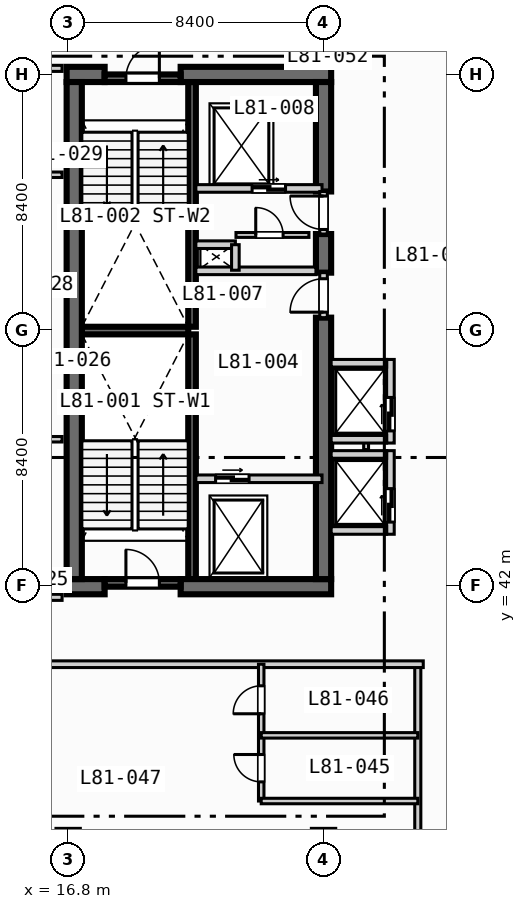
"""IFC4 building model, lengths in metres.
Left out: names, types, materials, properties, quantities, classifications, styles, units other than length and angle.
Written with IfcOpenShell. Run it as: python <this file> out.ifc"""

import sys

from ifc_helpers import new_model, si_unit, direction, frame, frame_2d, origin, place, context, subcontext, project, spatial, rectangle, extrude, element, fill, save


model = new_model("IFC4")
c1 = context("Model", 3, precision=1e-05, world=origin(), true_north=direction((0.0, 1.0)))
c2 = subcontext(c1, "Body", "Model", "MODEL_VIEW")
j1 = project(units=[si_unit("LENGTHUNIT", "METRE"), si_unit("PLANEANGLEUNIT", "RADIAN")], contexts=[c1])
p1 = place(None, origin())
s1 = spatial("IfcSite", under=j1, at=p1, CompositionType="ELEMENT")
p2 = place(p1, origin())
s2 = spatial("IfcBuilding", under=s1, at=p2, CompositionType="ELEMENT")
p3 = place(p2, frame((0.0, 0.0, 328.1)))
s3 = spatial("IfcBuildingStorey", under=s2, at=p3, CompositionType="ELEMENT", Elevation=328.1)
for number, where, z_axis, x_axis in (
    (1, (20.875, 42.2, 0.0), (0.0, 0.0, 1.0), (0.0, 1.0, 0.0)),
    (2, (20.875, 50.5, 0.0), (0.0, 0.0, 1.0), (0.0, 1.0, 0.0)),
):
    element("IfcWall", number, at=place(p3, frame(where, z_axis=z_axis, x_axis=x_axis)), inside=s3, PredefinedType="SOLIDWALL", context=c2, shape_type="SweptSolid", body=[
        extrude(rectangle(XDim=8.05, YDim=0.25, at=frame_2d((4.025, 0.0))), origin(), (0.0, 0.0, 1.0), 3.67),
    ])
p4 = place(p3, frame((17.25, 50.375, 0.0), z_axis=(0.0, 0.0, 1.0), x_axis=(1.0, 0.0, 0.0)))
e3 = element("IfcWall", 3, at=p4, inside=s3, PredefinedType="SOLIDWALL", context=c2, shape_type="SweptSolid", body=[
    extrude(rectangle(XDim=3.5, YDim=0.25, at=frame_2d((1.75, 0.0))), origin(), (0.0, 0.0, 1.0), 3.67),
])
p5 = place(p3, frame((16.75, 41.95, 0.0), z_axis=(0.0, 0.0, 1.0), x_axis=(1.0, 0.0, 0.0)))
e4 = element("IfcWall", 4, at=p5, inside=s3, PredefinedType="SHEAR", context=c2, shape_type="SweptSolid", body=[
    extrude(rectangle(XDim=1.25, YDim=0.5, at=frame_2d((0.625, 0.0))), origin(), (0.0, 0.0, 1.0), 3.67),
])
p6 = place(p3, frame((20.5, 41.95, 0.0), z_axis=(0.0, 0.0, 1.0), x_axis=(1.0, 0.0, 0.0)))
e5 = element("IfcWall", 5, at=p6, inside=s3, PredefinedType="SHEAR", context=c2, shape_type="SweptSolid", body=[
    extrude(rectangle(XDim=4.95, YDim=0.5, at=frame_2d((2.475, 0.0))), origin(), (0.0, 0.0, 1.0), 3.67),
])
p7 = place(p3, frame((16.75, 58.8, 0.0), z_axis=(0.0, 0.0, 1.0), x_axis=(1.0, 0.0, 0.0)))
e6 = element("IfcWall", 6, at=p7, inside=s3, PredefinedType="SHEAR", context=c2, shape_type="SweptSolid", body=[
    extrude(rectangle(XDim=1.25, YDim=0.5, at=frame_2d((0.625, 0.0))), origin(), (0.0, 0.0, 1.0), 3.67),
])
p8 = place(p3, frame((20.5, 58.8, 0.0), z_axis=(0.0, 0.0, 1.0), x_axis=(1.0, 0.0, 0.0)))
e7 = element("IfcWall", 7, at=p8, inside=s3, PredefinedType="SHEAR", context=c2, shape_type="SweptSolid", body=[
    extrude(rectangle(XDim=4.95, YDim=0.5, at=frame_2d((2.475, 0.0))), origin(), (0.0, 0.0, 1.0), 3.67),
])
p9 = place(p3, frame((17.0, 42.2, 0.0), z_axis=(0.0, 0.0, 1.0), x_axis=(0.0, 1.0, 0.0)))
e8 = element("IfcWall", 8, at=p9, inside=s3, PredefinedType="SHEAR", context=c2, shape_type="SweptSolid", body=[
    extrude(rectangle(XDim=16.35, YDim=0.5, at=frame_2d((8.175, 0.0))), origin(), (0.0, 0.0, 1.0), 3.67),
])
p10 = place(p3, frame((25.2, 42.2, 0.0), z_axis=(0.0, 0.0, 1.0), x_axis=(0.0, 1.0, 0.0)))
e9 = element("IfcWall", 9, at=p10, inside=s3, PredefinedType="SHEAR", context=c2, shape_type="SweptSolid", body=[
    extrude(rectangle(XDim=8.6, YDim=0.5, at=frame_2d((4.3, 0.0))), origin(), (0.0, 0.0, 1.0), 3.67),
])
p11 = place(p3, frame((25.2, 52.28, 0.0), z_axis=(0.0, 0.0, 1.0), x_axis=(0.0, 1.0, 0.0)))
e10 = element("IfcWall", 10, at=p11, inside=s3, PredefinedType="SHEAR", context=c2, shape_type="SweptSolid", body=[
    extrude(rectangle(XDim=1.27, YDim=0.5, at=frame_2d((0.635, 0.0))), origin(), (0.0, 0.0, 1.0), 3.67),
])
p12 = place(p3, frame((25.2, 54.95, 0.0), z_axis=(0.0, 0.0, 1.0), x_axis=(0.0, 1.0, 0.0)))
e11 = element("IfcWall", 11, at=p12, inside=s3, PredefinedType="SHEAR", context=c2, shape_type="SweptSolid", body=[
    extrude(rectangle(XDim=3.6, YDim=0.5, at=frame_2d((1.8, 0.0))), origin(), (0.0, 0.0, 1.0), 3.67),
])
p13 = place(p3, frame((18.0, 42.075, 0.0), z_axis=(0.0, 0.0, 1.0), x_axis=(1.0, 0.0, 0.0)))
e12 = element("IfcWall", 12, at=p13, inside=s3, PredefinedType="SOLIDWALL", context=c2, shape_type="SweptSolid", body=[
    extrude(rectangle(XDim=2.5, YDim=0.25, at=frame_2d((1.25, 0.0))), origin(), (0.0, 0.0, 1.0), 3.67),
])
p14 = place(p13, frame((0.7, 0.0, 0.0)))
e13 = element("IfcOpeningElement", 13, at=p14, cuts=e12, PredefinedType="OPENING", context=c2, shape_type="SweptSolid", body=[
    extrude(rectangle(XDim=1.1, YDim=2.15, at=frame_2d((0.55, 1.075))), frame((0.0, 0.135, 0.0), z_axis=(0.0, -1.0, 0.0), x_axis=(1.0, 0.0, 0.0)), (0.0, 0.0, 1.0), 0.27),
])
p15 = place(p3, frame((18.0, 58.675, 0.0), z_axis=(0.0, 0.0, 1.0), x_axis=(1.0, 0.0, 0.0)))
e14 = element("IfcWall", 14, at=p15, inside=s3, PredefinedType="SOLIDWALL", context=c2, shape_type="SweptSolid", body=[
    extrude(rectangle(XDim=2.5, YDim=0.25, at=frame_2d((1.25, 0.0))), origin(), (0.0, 0.0, 1.0), 3.67),
])
p16 = place(p15, frame((0.7, 0.0, 0.0)))
e15 = element("IfcOpeningElement", 15, at=p16, cuts=e14, PredefinedType="OPENING", context=c2, shape_type="SweptSolid", body=[
    extrude(rectangle(XDim=1.1, YDim=2.15, at=frame_2d((0.55, 1.075))), frame((0.0, 0.135, 0.0), z_axis=(0.0, -1.0, 0.0), x_axis=(1.0, 0.0, 0.0)), (0.0, 0.0, 1.0), 0.27),
])
p17 = place(p3, frame((21.0, 45.5, 0.0), z_axis=(0.0, 0.0, 1.0), x_axis=(1.0, 0.0, 0.0)))
e16 = element("IfcWall", 16, at=p17, inside=s3, PredefinedType="SOLIDWALL", context=c2, shape_type="SweptSolid", body=[
    extrude(rectangle(XDim=4.15, YDim=0.25, at=frame_2d((2.075, 0.0))), origin(), (0.0, 0.0, 1.0), 3.67),
])
p18 = place(p17, frame((0.65, 0.0, 0.0)))
e17 = element("IfcOpeningElement", 17, at=p18, cuts=e16, PredefinedType="OPENING", context=c2, shape_type="SweptSolid", body=[
    extrude(rectangle(XDim=1.1, YDim=2.15, at=frame_2d((0.55, 1.075))), frame((0.0, 0.135, 0.0), z_axis=(0.0, -1.0, 0.0), x_axis=(1.0, 0.0, 0.0)), (0.0, 0.0, 1.0), 0.27),
])
p19 = place(p3, frame((25.2, 50.8, 0.0), z_axis=(0.0, 0.0, 1.0), x_axis=(0.0, 1.0, 0.0)))
e18 = element("IfcWall", 18, at=p19, inside=s3, PredefinedType="SOLIDWALL", context=c2, shape_type="SweptSolid", body=[
    extrude(rectangle(XDim=1.48, YDim=0.25, at=frame_2d((0.74, 0.0))), origin(), (0.0, 0.0, 1.0), 3.67),
])
p20 = place(p19, frame((0.18, 0.0, 0.0)))
e19 = element("IfcOpeningElement", 19, at=p20, cuts=e18, PredefinedType="OPENING", context=c2, shape_type="SweptSolid", body=[
    extrude(rectangle(XDim=1.1, YDim=2.15, at=frame_2d((0.55, 1.075))), frame((0.0, 0.135, 0.0), z_axis=(0.0, -1.0, 0.0), x_axis=(1.0, 0.0, 0.0)), (0.0, 0.0, 1.0), 0.27),
])
p21 = place(p3, frame((21.0, 52.34, 0.0), z_axis=(0.0, 0.0, 1.0), x_axis=(1.0, 0.0, 0.0)))
e20 = element("IfcWall", 20, at=p21, inside=s3, PredefinedType="SOLIDWALL", context=c2, shape_type="SweptSolid", body=[
    extrude(rectangle(XDim=3.95, YDim=0.25, at=frame_2d((1.975, 0.0))), origin(), (0.0, 0.0, 1.0), 3.67),
])
p22 = place(p3, frame((21.0, 55.05, 0.0), z_axis=(0.0, 0.0, 1.0), x_axis=(1.0, 0.0, 0.0)))
e21 = element("IfcWall", 21, at=p22, inside=s3, PredefinedType="SOLIDWALL", context=c2, shape_type="SweptSolid", body=[
    extrude(rectangle(XDim=4.15, YDim=0.25, at=frame_2d((2.075, 0.0))), origin(), (0.0, 0.0, 1.0), 3.67),
])
p23 = place(p22, frame((1.85, 0.0, 0.0)))
e22 = element("IfcOpeningElement", 22, at=p23, cuts=e21, PredefinedType="OPENING", context=c2, shape_type="SweptSolid", body=[
    extrude(rectangle(XDim=1.1, YDim=2.15, at=frame_2d((0.55, 1.075))), frame((0.0, 0.135, 0.0), z_axis=(0.0, -1.0, 0.0), x_axis=(1.0, 0.0, 0.0)), (0.0, 0.0, 1.0), 0.27),
])
p24 = place(p3, frame((25.2, 53.55, 0.0), z_axis=(0.0, 0.0, 1.0), x_axis=(0.0, 1.0, 0.0)))
e23 = element("IfcWall", 23, at=p24, inside=s3, PredefinedType="SOLIDWALL", context=c2, shape_type="SweptSolid", body=[
    extrude(rectangle(XDim=1.4, YDim=0.25, at=frame_2d((0.7, 0.0))), origin(), (0.0, 0.0, 1.0), 3.67),
])
p25 = place(p24, frame((0.15, 0.0, 0.0)))
e24 = element("IfcOpeningElement", 24, at=p25, cuts=e23, PredefinedType="OPENING", context=c2, shape_type="SweptSolid", body=[
    extrude(rectangle(XDim=1.1, YDim=2.15, at=frame_2d((0.55, 1.075))), frame((0.0, 0.135, 0.0), z_axis=(0.0, -1.0, 0.0), x_axis=(1.0, 0.0, 0.0)), (0.0, 0.0, 1.0), 0.27),
])
p26 = place(p3, frame((21.0, 53.2, 0.0), z_axis=(0.0, 0.0, 1.0), x_axis=(1.0, 0.0, 0.0)))
e25 = element("IfcWall", 25, at=p26, inside=s3, PredefinedType="SOLIDWALL", context=c2, shape_type="SweptSolid", body=[
    extrude(rectangle(XDim=1.3, YDim=0.25, at=frame_2d((0.65, 0.0))), origin(), (0.0, 0.0, 1.0), 3.67),
])
p27 = place(p3, frame((22.3, 52.36, 0.0), z_axis=(0.0, 0.0, 1.0), x_axis=(0.0, 1.0, 0.0)))
e26 = element("IfcWall", 26, at=p27, inside=s3, PredefinedType="SOLIDWALL", context=c2, shape_type="SweptSolid", body=[
    extrude(rectangle(XDim=0.84, YDim=0.25, at=frame_2d((0.42, 0.0))), origin(), (0.0, 0.0, 1.0), 3.67),
])
p28 = place(p3, frame((22.32, 53.52, 0.0), z_axis=(0.0, 0.0, 1.0), x_axis=(1.0, 0.0, 0.0)))
e27 = element("IfcWall", 27, at=p28, inside=s3, PredefinedType="PARTITIONING", context=c2, shape_type="SweptSolid", body=[
    extrude(rectangle(XDim=2.4, YDim=0.16, at=frame_2d((1.2, 0.0))), origin(), (0.0, 0.0, 1.0), 3.67),
])
p29 = place(p28, frame((0.65, 0.0, 0.0)))
e28 = element("IfcOpeningElement", 28, at=p29, cuts=e27, PredefinedType="OPENING", context=c2, shape_type="SweptSolid", body=[
    extrude(rectangle(XDim=0.9, YDim=2.1, at=frame_2d((0.45, 1.05))), frame((0.0, 0.09, 0.0), z_axis=(0.0, -1.0, 0.0), x_axis=(1.0, 0.0, 0.0)), (0.0, 0.0, 1.0), 0.18),
])
p30 = place(p3, frame((27.4, 43.675, 0.0), z_axis=(0.0, 0.0, 1.0), x_axis=(0.0, 1.0, 0.0)))
e29 = element("IfcWall", 29, at=p30, inside=s3, PredefinedType="SOLIDWALL", context=c2, shape_type="SweptSolid", body=[
    extrude(rectangle(XDim=2.75, YDim=0.25, at=frame_2d((1.375, 0.0))), origin(), (0.0, 0.0, 1.0), 3.67),
])
p31 = place(p30, frame((0.4, 0.0, 0.0)))
e30 = element("IfcOpeningElement", 30, at=p31, cuts=e29, PredefinedType="OPENING", context=c2, shape_type="SweptSolid", body=[
    extrude(rectangle(XDim=1.1, YDim=2.15, at=frame_2d((0.55, 1.075))), frame((0.0, 0.135, 0.0), z_axis=(0.0, -1.0, 0.0), x_axis=(1.0, 0.0, 0.0)), (0.0, 0.0, 1.0), 0.27),
])
for number, where, z_axis, x_axis in (
    (31, (25.45, 43.8, 0.0), (0.0, 0.0, 1.0), (1.0, 0.0, 0.0)),
    (32, (25.45, 46.3, 0.0), (0.0, 0.0, 1.0), (1.0, 0.0, 0.0)),
):
    element("IfcWall", number, at=place(p3, frame(where, z_axis=z_axis, x_axis=x_axis)), inside=s3, PredefinedType="SOLIDWALL", context=c2, shape_type="SweptSolid", body=[
        extrude(rectangle(XDim=1.825, YDim=0.25, at=frame_2d((0.913, 0.0))), origin(), (0.0, 0.0, 1.0), 3.67),
    ])
p32 = place(p3, frame((26.6, 46.46, 0.0), z_axis=(0.0, 0.0, 1.0), x_axis=(0.0, 1.0, 0.0)))
e33 = element("IfcWall", 33, at=p32, inside=s3, PredefinedType="PARTITIONING", context=c2, shape_type="SweptSolid", body=[
    extrude(rectangle(XDim=0.88, YDim=0.16, at=frame_2d((0.44, 0.0))), origin(), (0.0, 0.0, 1.0), 3.67),
])
p33 = place(p3, frame((27.4, 46.675, 0.0), z_axis=(0.0, 0.0, 1.0), x_axis=(0.0, 1.0, 0.0)))
e34 = element("IfcWall", 34, at=p33, inside=s3, PredefinedType="SOLIDWALL", context=c2, shape_type="SweptSolid", body=[
    extrude(rectangle(XDim=2.75, YDim=0.25, at=frame_2d((1.375, 0.0))), origin(), (0.0, 0.0, 1.0), 3.67),
])
p34 = place(p33, frame((0.4, 0.0, 0.0)))
e35 = element("IfcOpeningElement", 35, at=p34, cuts=e34, PredefinedType="OPENING", context=c2, shape_type="SweptSolid", body=[
    extrude(rectangle(XDim=1.1, YDim=2.15, at=frame_2d((0.55, 1.075))), frame((0.0, 0.135, 0.0), z_axis=(0.0, -1.0, 0.0), x_axis=(1.0, 0.0, 0.0)), (0.0, 0.0, 1.0), 0.27),
])
for number, where, z_axis, x_axis in (
    (36, (25.45, 46.8, 0.0), (0.0, 0.0, 1.0), (1.0, 0.0, 0.0)),
    (37, (25.45, 49.3, 0.0), (0.0, 0.0, 1.0), (1.0, 0.0, 0.0)),
):
    element("IfcWall", number, at=place(p3, frame(where, z_axis=z_axis, x_axis=x_axis)), inside=s3, PredefinedType="SOLIDWALL", context=c2, shape_type="SweptSolid", body=[
        extrude(rectangle(XDim=1.825, YDim=0.25, at=frame_2d((0.913, 0.0))), origin(), (0.0, 0.0, 1.0), 3.67),
    ])
p35 = place(p3, frame((8.65, 41.6, 0.0), z_axis=(0.0, 0.0, 1.0), x_axis=(1.0, 0.0, 0.0)))
e38 = element("IfcWall", 38, at=p35, inside=s3, PredefinedType="PARTITIONING", context=c2, shape_type="SweptSolid", body=[
    extrude(rectangle(XDim=7.95, YDim=0.2, at=frame_2d((3.975, 0.0))), origin(), (0.0, 0.0, 1.0), 3.67),
])
p36 = place(p35, frame((2.0, 0.0, 0.0)))
e39 = element("IfcOpeningElement", 39, at=p36, cuts=e38, PredefinedType="OPENING", context=c2, shape_type="SweptSolid", body=[
    extrude(rectangle(XDim=1.0, YDim=2.15, at=frame_2d((0.5, 1.075))), frame((0.0, 0.11, 0.0), z_axis=(0.0, -1.0, 0.0), x_axis=(1.0, 0.0, 0.0)), (0.0, 0.0, 1.0), 0.22),
])
p37 = place(p3, frame((8.65, 59.0, 0.0), z_axis=(0.0, 0.0, 1.0), x_axis=(1.0, 0.0, 0.0)))
e40 = element("IfcWall", 40, at=p37, inside=s3, PredefinedType="PARTITIONING", context=c2, shape_type="SweptSolid", body=[
    extrude(rectangle(XDim=7.95, YDim=0.2, at=frame_2d((3.975, 0.0))), origin(), (0.0, 0.0, 1.0), 3.316),
])
p38 = place(p37, frame((2.0, 0.0, 0.0)))
e41 = element("IfcOpeningElement", 41, at=p38, cuts=e40, PredefinedType="OPENING", context=c2, shape_type="SweptSolid", body=[
    extrude(rectangle(XDim=1.0, YDim=2.15, at=frame_2d((0.5, 1.075))), frame((0.0, 0.11, 0.0), z_axis=(0.0, -1.0, 0.0), x_axis=(1.0, 0.0, 0.0)), (0.0, 0.0, 1.0), 0.22),
])
p39 = place(p3, frame((8.65, 52.0, 0.0), z_axis=(0.0, 0.0, 1.0), x_axis=(1.0, 0.0, 0.0)))
e42 = element("IfcWall", 42, at=p39, inside=s3, PredefinedType="PARTITIONING", context=c2, shape_type="SweptSolid", body=[
    extrude(rectangle(XDim=7.95, YDim=0.22, at=frame_2d((3.975, 0.0))), origin(), (0.0, 0.0, 1.0), 3.67),
])
for number, where, z_axis, x_axis in (
    (43, (13.8, 46.8, 0.0), (0.0, 0.0, 1.0), (1.0, 0.0, 0.0)),
    (44, (13.8, 55.5, 0.0), (0.0, 0.0, 1.0), (1.0, 0.0, 0.0)),
):
    element("IfcWall", number, at=place(p3, frame(where, z_axis=z_axis, x_axis=x_axis)), inside=s3, PredefinedType="PLUMBINGWALL", context=c2, shape_type="SweptSolid", body=[
        extrude(rectangle(XDim=2.8, YDim=0.18, at=frame_2d((1.4, 0.0))), origin(), (0.0, 0.0, 1.0), 3.67),
    ])
p40 = place(p3, frame((28.3, 24.25, 0.0), z_axis=(0.0, 0.0, 1.0), x_axis=(0.0, 1.0, 0.0)))
e45 = element("IfcWall", 45, at=p40, inside=s3, PredefinedType="PARTITIONING", context=c2, shape_type="SweptSolid", body=[
    extrude(rectangle(XDim=15.15, YDim=0.2, at=frame_2d((7.575, 0.0))), origin(), (0.0, 0.0, 1.0), 3.67),
])
p41 = place(p40, frame((1.058, 0.0, 0.0)))
e46 = element("IfcOpeningElement", 46, at=p41, cuts=e45, PredefinedType="OPENING", context=c2, shape_type="SweptSolid", body=[
    extrude(rectangle(XDim=1.0, YDim=2.15, at=frame_2d((0.5, 1.075))), frame((0.0, 0.11, 0.0), z_axis=(0.0, -1.0, 0.0), x_axis=(1.0, 0.0, 0.0)), (0.0, 0.0, 1.0), 0.22),
])
p42 = place(p40, frame((8.633, 0.0, 0.0)))
e47 = element("IfcOpeningElement", 47, at=p42, cuts=e45, PredefinedType="OPENING", context=c2, shape_type="SweptSolid", body=[
    extrude(rectangle(XDim=1.0, YDim=2.15, at=frame_2d((0.5, 1.075))), frame((0.0, 0.11, 0.0), z_axis=(0.0, -1.0, 0.0), x_axis=(1.0, 0.0, 0.0)), (0.0, 0.0, 1.0), 0.22),
])
p43 = place(p3, frame((8.6, 39.4, 0.0), z_axis=(0.0, 0.0, 1.0), x_axis=(1.0, 0.0, 0.0)))
e48 = element("IfcWall", 48, at=p43, inside=s3, PredefinedType="PARTITIONING", context=c2, shape_type="SweptSolid", body=[
    extrude(rectangle(XDim=19.88, YDim=0.22, at=frame_2d((9.94, 0.0))), origin(), (0.0, 0.0, 1.0), 3.67),
])
p44 = place(p3, frame((23.15, 34.9, 0.0), z_axis=(0.0, 0.0, 1.0), x_axis=(0.0, 1.0, 0.0)))
e49 = element("IfcWall", 49, at=p44, inside=s3, PredefinedType="PLUMBINGWALL", context=c2, shape_type="SweptSolid", body=[
    extrude(rectangle(XDim=4.5, YDim=0.18, at=frame_2d((2.25, 0.0))), origin(), (0.0, 0.0, 1.0), 3.67),
])
p45 = place(p44, frame((0.63, 0.0, 0.0)))
e50 = element("IfcOpeningElement", 50, at=p45, cuts=e49, PredefinedType="OPENING", context=c2, shape_type="SweptSolid", body=[
    extrude(rectangle(XDim=0.9, YDim=2.1, at=frame_2d((0.45, 1.05))), frame((0.0, 0.1, 0.0), z_axis=(0.0, -1.0, 0.0), x_axis=(1.0, 0.0, 0.0)), (0.0, 0.0, 1.0), 0.2),
])
p46 = place(p44, frame((2.87, 0.0, 0.0)))
e51 = element("IfcOpeningElement", 51, at=p46, cuts=e49, PredefinedType="OPENING", context=c2, shape_type="SweptSolid", body=[
    extrude(rectangle(XDim=0.92, YDim=2.1, at=frame_2d((0.46, 1.05))), frame((0.0, 0.1, 0.0), z_axis=(0.0, -1.0, 0.0), x_axis=(1.0, 0.0, 0.0)), (0.0, 0.0, 1.0), 0.2),
])
for number, where, z_axis, x_axis in (
    (52, (23.15, 34.9, 0.0), (0.0, 0.0, 1.0), (1.0, 0.0, 0.0)),
    (53, (23.15, 37.06, 0.0), (0.0, 0.0, 1.0), (1.0, 0.0, 0.0)),
):
    element("IfcWall", number, at=place(p3, frame(where, z_axis=z_axis, x_axis=x_axis)), inside=s3, PredefinedType="PLUMBINGWALL", context=c2, shape_type="SweptSolid", body=[
        extrude(rectangle(XDim=5.15, YDim=0.18, at=frame_2d((2.575, 0.0))), origin(), (0.0, 0.0, 1.0), 3.67),
    ])
p47 = place(p14, origin())
e54 = element("IfcDoor", 54, at=p47, inside=s3, OperationType="SINGLE_SWING_LEFT", PredefinedType="DOOR", context=c2, shape_type="SweptSolid", body=[
    extrude(rectangle(XDim=1.1, YDim=2.15, at=frame_2d((0.55, 1.075))), frame((0.0, 0.025, 0.0), z_axis=(0.0, -1.0, 0.0), x_axis=(1.0, 0.0, 0.0)), (0.0, 0.0, 1.0), 0.05),
])
fill(e13, e54)
p48 = place(p16, origin())
e55 = element("IfcDoor", 55, at=p48, inside=s3, OperationType="SINGLE_SWING_RIGHT", PredefinedType="DOOR", context=c2, shape_type="SweptSolid", body=[
    extrude(rectangle(XDim=1.1, YDim=2.15, at=frame_2d((0.55, 1.075))), frame((0.0, 0.025, 0.0), z_axis=(0.0, -1.0, 0.0), x_axis=(1.0, 0.0, 0.0)), (0.0, 0.0, 1.0), 0.05),
])
fill(e15, e55)
p49 = place(p18, origin())
e56 = element("IfcDoor", 56, at=p49, inside=s3, OperationType="SLIDING_TO_LEFT", PredefinedType="DOOR", context=c2, shape_type="SweptSolid", body=[
    extrude(rectangle(XDim=1.1, YDim=2.15, at=frame_2d((0.55, 1.075))), frame((0.0, 0.025, 0.0), z_axis=(0.0, -1.0, 0.0), x_axis=(1.0, 0.0, 0.0)), (0.0, 0.0, 1.0), 0.05),
])
fill(e17, e56)
p50 = place(p20, origin())
e57 = element("IfcDoor", 57, at=p50, inside=s3, OperationType="SINGLE_SWING_LEFT", PredefinedType="DOOR", context=c2, shape_type="SweptSolid", body=[
    extrude(rectangle(XDim=1.1, YDim=2.15, at=frame_2d((0.55, 1.075))), frame((0.0, 0.025, 0.0), z_axis=(0.0, -1.0, 0.0), x_axis=(1.0, 0.0, 0.0)), (0.0, 0.0, 1.0), 0.05),
])
fill(e19, e57)
p51 = place(p23, origin())
e58 = element("IfcDoor", 58, at=p51, inside=s3, OperationType="SLIDING_TO_LEFT", PredefinedType="DOOR", context=c2, shape_type="SweptSolid", body=[
    extrude(rectangle(XDim=1.1, YDim=2.15, at=frame_2d((0.55, 1.075))), frame((0.0, 0.025, 0.0), z_axis=(0.0, -1.0, 0.0), x_axis=(1.0, 0.0, 0.0)), (0.0, 0.0, 1.0), 0.05),
])
fill(e22, e58)
p52 = place(p25, origin())
e59 = element("IfcDoor", 59, at=p52, inside=s3, OperationType="SINGLE_SWING_RIGHT", PredefinedType="DOOR", context=c2, shape_type="SweptSolid", body=[
    extrude(rectangle(XDim=1.1, YDim=2.15, at=frame_2d((0.55, 1.075))), frame((0.0, 0.025, 0.0), z_axis=(0.0, -1.0, 0.0), x_axis=(1.0, 0.0, 0.0)), (0.0, 0.0, 1.0), 0.05),
])
fill(e24, e59)
p53 = place(p29, origin())
e60 = element("IfcDoor", 60, at=p53, inside=s3, OperationType="SINGLE_SWING_LEFT", PredefinedType="DOOR", context=c2, shape_type="SweptSolid", body=[
    extrude(rectangle(XDim=0.9, YDim=2.1, at=frame_2d((0.45, 1.05))), frame((0.0, 0.025, 0.0), z_axis=(0.0, -1.0, 0.0), x_axis=(1.0, 0.0, 0.0)), (0.0, 0.0, 1.0), 0.05),
])
fill(e28, e60)
p54 = place(p31, origin())
e61 = element("IfcDoor", 61, at=p54, inside=s3, OperationType="SLIDING_TO_LEFT", PredefinedType="DOOR", context=c2, shape_type="SweptSolid", body=[
    extrude(rectangle(XDim=1.1, YDim=2.15, at=frame_2d((0.55, 1.075))), frame((0.0, 0.025, 0.0), z_axis=(0.0, -1.0, 0.0), x_axis=(1.0, 0.0, 0.0)), (0.0, 0.0, 1.0), 0.05),
])
fill(e30, e61)
p55 = place(p34, origin())
e62 = element("IfcDoor", 62, at=p55, inside=s3, OperationType="SLIDING_TO_LEFT", PredefinedType="DOOR", context=c2, shape_type="SweptSolid", body=[
    extrude(rectangle(XDim=1.1, YDim=2.15, at=frame_2d((0.55, 1.075))), frame((0.0, 0.025, 0.0), z_axis=(0.0, -1.0, 0.0), x_axis=(1.0, 0.0, 0.0)), (0.0, 0.0, 1.0), 0.05),
])
fill(e35, e62)
p56 = place(p45, origin())
e63 = element("IfcDoor", 63, at=p56, inside=s3, OperationType="SINGLE_SWING_RIGHT", PredefinedType="DOOR", context=c2, shape_type="SweptSolid", body=[
    extrude(rectangle(XDim=0.9, YDim=2.1, at=frame_2d((0.45, 1.05))), frame((0.0, 0.025, 0.0), z_axis=(0.0, -1.0, 0.0), x_axis=(1.0, 0.0, 0.0)), (0.0, 0.0, 1.0), 0.05),
])
fill(e50, e63)
p57 = place(p46, origin())
e64 = element("IfcDoor", 64, at=p57, inside=s3, OperationType="SINGLE_SWING_LEFT", PredefinedType="DOOR", context=c2, shape_type="SweptSolid", body=[
    extrude(rectangle(XDim=0.92, YDim=2.1, at=frame_2d((0.46, 1.05))), frame((0.0, 0.025, 0.0), z_axis=(0.0, -1.0, 0.0), x_axis=(1.0, 0.0, 0.0)), (0.0, 0.0, 1.0), 0.05),
])
fill(e51, e64)
save(model, sys.argv[1])
